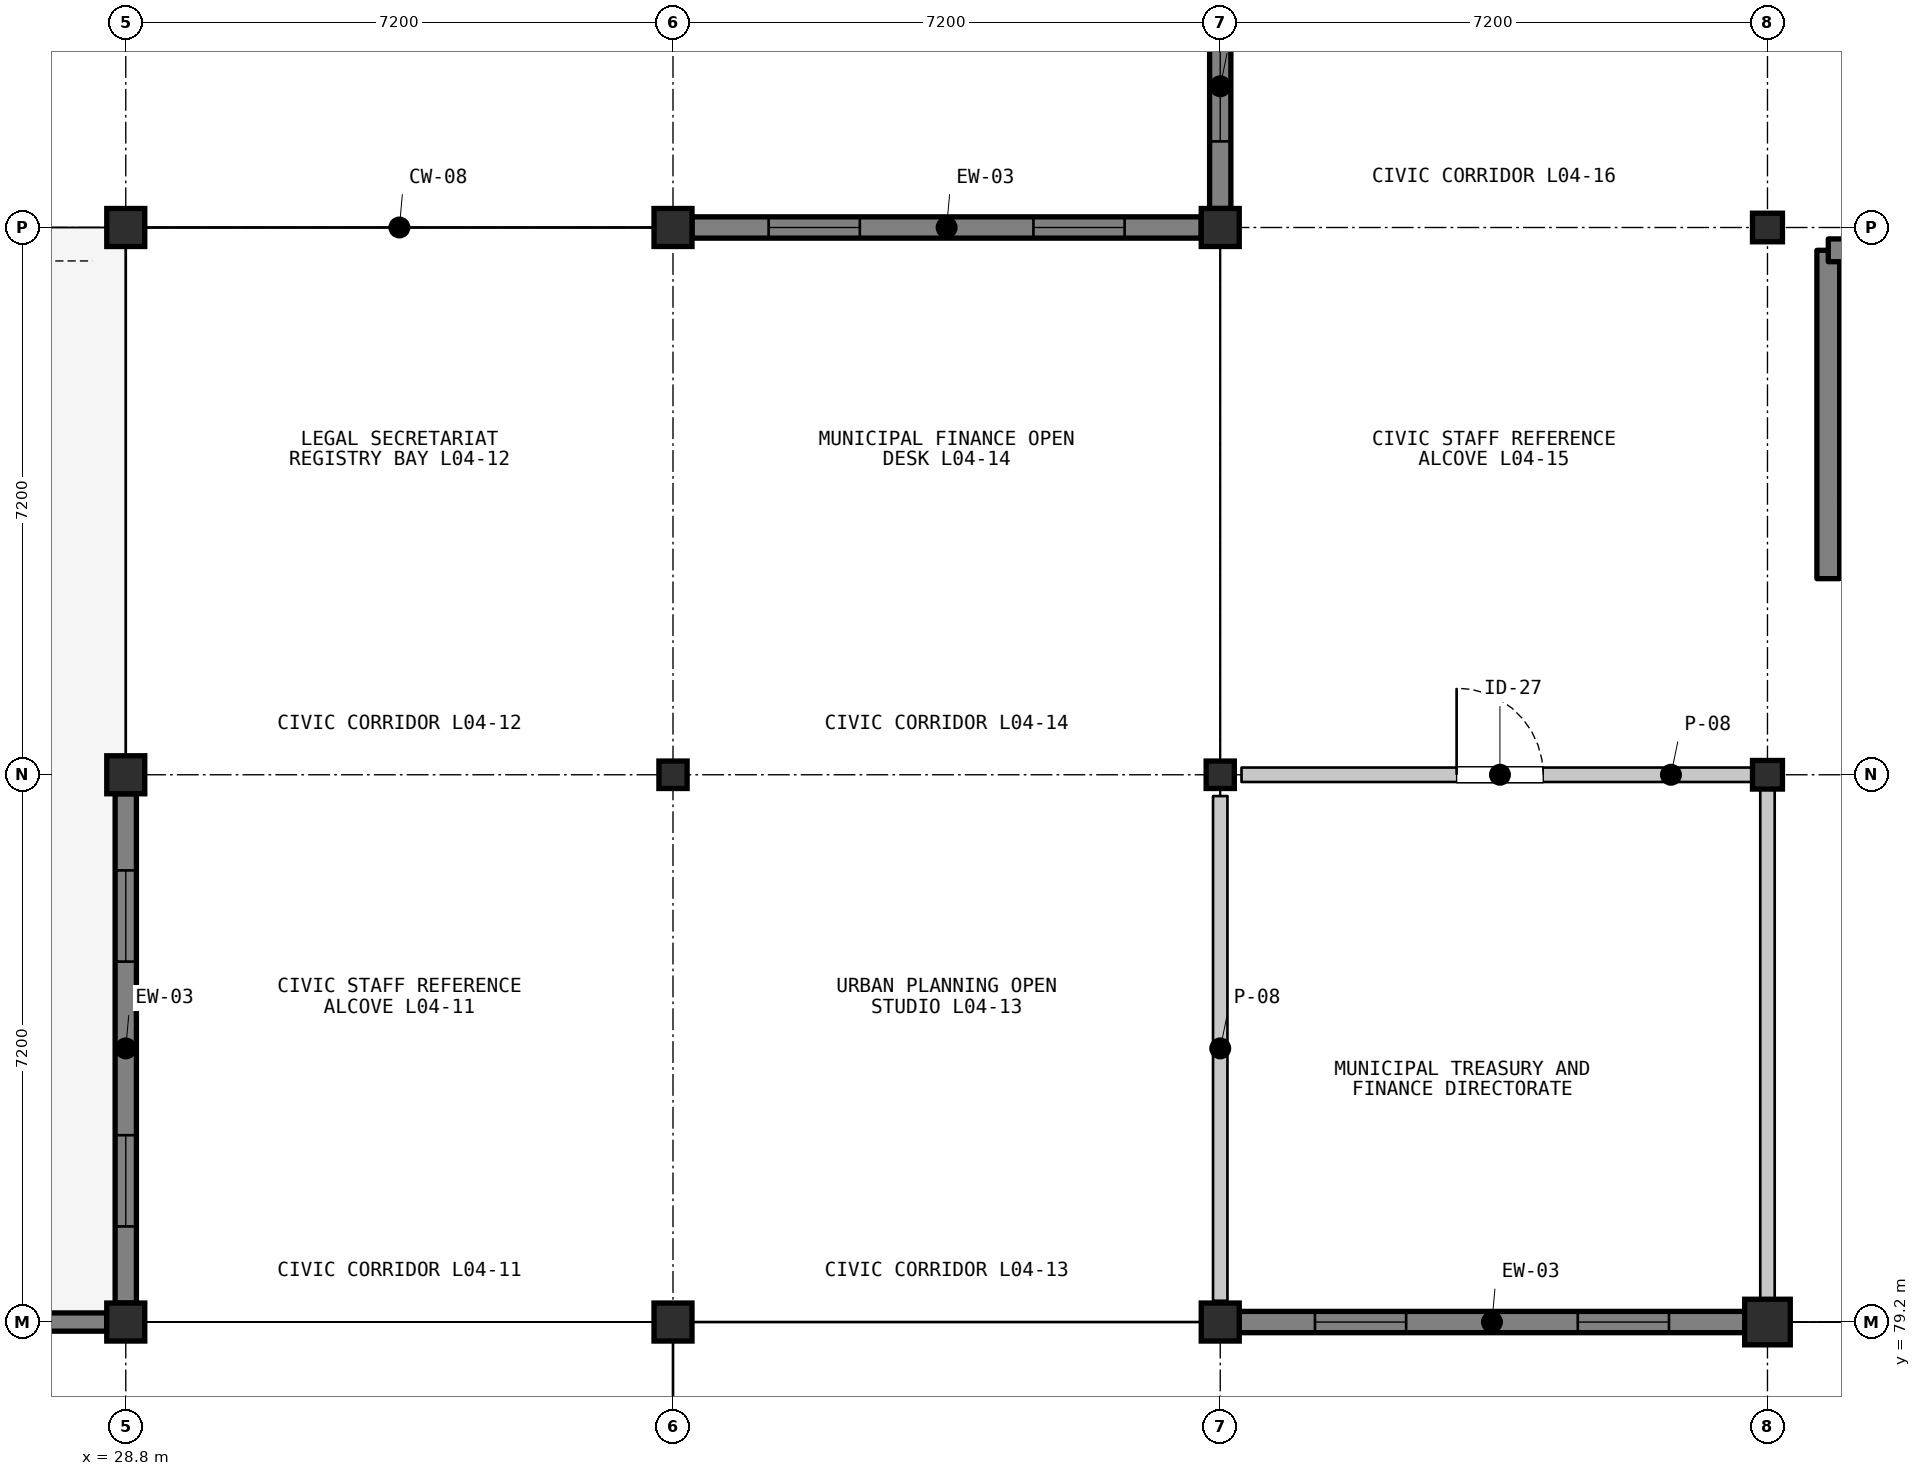
"""IFC4 building model, lengths in metres.
Left out: names, types, materials, properties, quantities, classifications, styles, units other than length and angle.
Written with IfcOpenShell. Run it as: python <this file> out.ifc"""

import sys

from ifc_helpers import new_model, si_unit, direction, frame, frame_2d, origin, origin_2d, place, context, subcontext, project, spatial, rectangle, i_section, extrude, element, fill, save


model = new_model("IFC4")
c1 = context("Model", 3, precision=1e-05, world=origin(), true_north=direction((0.0, 1.0)))
c2 = subcontext(c1, "Body", "Model", "MODEL_VIEW")
j1 = project(units=[si_unit("LENGTHUNIT", "METRE"), si_unit("PLANEANGLEUNIT", "RADIAN")], contexts=[c1])
p1 = place(None, origin())
s1 = spatial("IfcSite", under=j1, at=p1, CompositionType="ELEMENT")
p2 = place(p1, origin())
s2 = spatial("IfcBuilding", under=s1, at=p2, CompositionType="ELEMENT")
p3 = place(p2, frame((0.0, 0.0, 14.1)))
s3 = spatial("IfcBuildingStorey", under=s2, at=p3, CompositionType="ELEMENT", Elevation=14.1)
for number, where, z_axis, x_axis in (
    (1, (28.8, 79.2, 0.0), (0.0, 0.0, 1.0), (1.0, 0.0, 0.0)),
    (2, (28.8, 86.4, 0.0), (0.0, 0.0, 1.0), (1.0, 0.0, 0.0)),
    (3, (28.8, 93.6, 0.0), (0.0, 0.0, 1.0), (1.0, 0.0, 0.0)),
    (4, (36.0, 79.2, 0.0), (0.0, 0.0, 1.0), (1.0, 0.0, 0.0)),
):
    element("IfcColumn", number, at=place(p3, frame(where, z_axis=z_axis, x_axis=x_axis)), inside=s3, PredefinedType="COLUMN", context=c2, shape_type="SweptSolid", body=[
        extrude(rectangle(XDim=0.5, YDim=0.5, at=origin_2d()), origin(), (0.0, 0.0, 1.0), 3.9),
    ])
p4 = place(p3, frame((36.0, 86.4, 0.0), z_axis=(0.0, 0.0, 1.0), x_axis=(1.0, 0.0, 0.0)))
e5 = element("IfcColumn", 5, at=p4, inside=s3, PredefinedType="COLUMN", context=c2, shape_type="SweptSolid", body=[
    extrude(i_section(OverallWidth=0.371, OverallDepth=0.361, WebThickness=0.012, FlangeThickness=0.02, FilletRadius=0.015, at=origin_2d()), origin(), (0.0, 0.0, 1.0), 3.9),
])
for number, where, z_axis, x_axis in (
    (6, (36.0, 93.6, 0.0), (0.0, 0.0, 1.0), (1.0, 0.0, 0.0)),
    (7, (43.2, 79.2, 0.0), (0.0, 0.0, 1.0), (1.0, 0.0, 0.0)),
):
    element("IfcColumn", number, at=place(p3, frame(where, z_axis=z_axis, x_axis=x_axis)), inside=s3, PredefinedType="COLUMN", context=c2, shape_type="SweptSolid", body=[
        extrude(rectangle(XDim=0.5, YDim=0.5, at=origin_2d()), origin(), (0.0, 0.0, 1.0), 3.9),
    ])
p5 = place(p3, frame((43.2, 86.4, 0.0), z_axis=(0.0, 0.0, 1.0), x_axis=(1.0, 0.0, 0.0)))
e8 = element("IfcColumn", 8, at=p5, inside=s3, PredefinedType="COLUMN", context=c2, shape_type="SweptSolid", body=[
    extrude(i_section(OverallWidth=0.371, OverallDepth=0.361, WebThickness=0.012, FlangeThickness=0.02, FilletRadius=0.015, at=origin_2d()), origin(), (0.0, 0.0, 1.0), 3.9),
])
p6 = place(p3, frame((43.2, 93.6, 0.0), z_axis=(0.0, 0.0, 1.0), x_axis=(1.0, 0.0, 0.0)))
e9 = element("IfcColumn", 9, at=p6, inside=s3, PredefinedType="COLUMN", context=c2, shape_type="SweptSolid", body=[
    extrude(rectangle(XDim=0.5, YDim=0.5, at=origin_2d()), origin(), (0.0, 0.0, 1.0), 3.9),
])
p7 = place(p3, frame((50.4, 79.2, 0.0), z_axis=(0.0, 0.0, 1.0), x_axis=(1.0, 0.0, 0.0)))
e10 = element("IfcColumn", 10, at=p7, inside=s3, PredefinedType="COLUMN", context=c2, shape_type="SweptSolid", body=[
    extrude(rectangle(XDim=0.6, YDim=0.6, at=origin_2d()), origin(), (0.0, 0.0, 1.0), 3.9),
])
for number, where, z_axis, x_axis in (
    (11, (50.4, 86.4, 0.0), (0.0, 0.0, 1.0), (1.0, 0.0, 0.0)),
    (12, (50.4, 93.6, 0.0), (0.0, 0.0, 1.0), (1.0, 0.0, 0.0)),
):
    element("IfcColumn", number, at=place(p3, frame(where, z_axis=z_axis, x_axis=x_axis)), inside=s3, PredefinedType="COLUMN", context=c2, shape_type="SweptSolid", body=[
        extrude(i_section(OverallWidth=0.394, OverallDepth=0.376, WebThickness=0.017, FlangeThickness=0.028, FilletRadius=0.015, at=origin_2d()), origin(), (0.0, 0.0, 1.0), 3.9),
    ])
p8 = place(p3, frame((21.85, 79.2, 0.0), z_axis=(0.0, 0.0, 1.0), x_axis=(1.0, 0.0, 0.0)))
e13 = element("IfcWall", 13, at=p8, inside=s3, PredefinedType="SOLIDWALL", context=c2, shape_type="SweptSolid", body=[
    extrude(rectangle(XDim=6.7, YDim=0.24, at=frame_2d((3.35, 0.0))), origin(), (0.0, 0.0, 1.0), 3.118),
])
p9 = place(p8, frame((2.5, 0.0, 0.0)))
e14 = element("IfcOpeningElement", 14, at=p9, cuts=e13, PredefinedType="OPENING", context=c2, shape_type="SweptSolid", body=[
    extrude(rectangle(XDim=1.7, YDim=2.25, at=frame_2d((0.85, 1.125))), frame((0.0, 0.13, 0.0), z_axis=(0.0, -1.0, 0.0), x_axis=(1.0, 0.0, 0.0)), (0.0, 0.0, 1.0), 0.26),
])
p10 = place(p3, frame((28.8, 79.45, 0.0), z_axis=(0.0, 0.0, 1.0), x_axis=(0.0, 1.0, 0.0)))
e15 = element("IfcWall", 15, at=p10, inside=s3, PredefinedType="SOLIDWALL", context=c2, shape_type="SweptSolid", body=[
    extrude(rectangle(XDim=6.7, YDim=0.28, at=frame_2d((3.35, 0.0))), origin(), (0.0, 0.0, 1.0), 3.172),
])
p11 = place(p10, frame((1.008, 0.0, 0.95)))
e16 = element("IfcOpeningElement", 16, at=p11, cuts=e15, PredefinedType="OPENING", context=c2, shape_type="SweptSolid", body=[
    extrude(rectangle(XDim=1.2, YDim=1.7, at=frame_2d((0.6, 0.85))), frame((0.0, 0.15, 0.0), z_axis=(0.0, -1.0, 0.0), x_axis=(1.0, 0.0, 0.0)), (0.0, 0.0, 1.0), 0.3),
])
p12 = place(p10, frame((4.492, 0.0, 0.95)))
e17 = element("IfcOpeningElement", 17, at=p12, cuts=e15, PredefinedType="OPENING", context=c2, shape_type="SweptSolid", body=[
    extrude(rectangle(XDim=1.2, YDim=1.7, at=frame_2d((0.6, 0.85))), frame((0.0, 0.15, 0.0), z_axis=(0.0, -1.0, 0.0), x_axis=(1.0, 0.0, 0.0)), (0.0, 0.0, 1.0), 0.3),
])
p13 = place(p3, frame((36.25, 93.6, 0.0), z_axis=(0.0, 0.0, 1.0), x_axis=(1.0, 0.0, 0.0)))
e18 = element("IfcWall", 18, at=p13, inside=s3, PredefinedType="SOLIDWALL", context=c2, shape_type="SweptSolid", body=[
    extrude(rectangle(XDim=6.7, YDim=0.28, at=frame_2d((3.35, 0.0))), origin(), (0.0, 0.0, 1.0), 3.118),
])
p14 = place(p13, frame((1.008, 0.0, 0.95)))
e19 = element("IfcOpeningElement", 19, at=p14, cuts=e18, PredefinedType="OPENING", context=c2, shape_type="SweptSolid", body=[
    extrude(rectangle(XDim=1.2, YDim=1.7, at=frame_2d((0.6, 0.85))), frame((0.0, 0.15, 0.0), z_axis=(0.0, -1.0, 0.0), x_axis=(1.0, 0.0, 0.0)), (0.0, 0.0, 1.0), 0.3),
])
p15 = place(p13, frame((4.492, 0.0, 0.95)))
e20 = element("IfcOpeningElement", 20, at=p15, cuts=e18, PredefinedType="OPENING", context=c2, shape_type="SweptSolid", body=[
    extrude(rectangle(XDim=1.2, YDim=1.7, at=frame_2d((0.6, 0.85))), frame((0.0, 0.15, 0.0), z_axis=(0.0, -1.0, 0.0), x_axis=(1.0, 0.0, 0.0)), (0.0, 0.0, 1.0), 0.3),
])
p16 = place(p3, frame((50.1, 79.2, 0.0), z_axis=(0.0, 0.0, 1.0), x_axis=(-1.0, 0.0, 0.0)))
e21 = element("IfcWall", 21, at=p16, inside=s3, PredefinedType="SOLIDWALL", context=c2, shape_type="SweptSolid", body=[
    extrude(rectangle(XDim=6.65, YDim=0.28, at=frame_2d((3.325, 0.0))), origin(), (0.0, 0.0, 1.0), 3.118),
])
p17 = place(p16, frame((0.996, 0.0, 0.95)))
e22 = element("IfcOpeningElement", 22, at=p17, cuts=e21, PredefinedType="OPENING", context=c2, shape_type="SweptSolid", body=[
    extrude(rectangle(XDim=1.2, YDim=1.7, at=frame_2d((0.6, 0.85))), frame((0.0, 0.15, 0.0), z_axis=(0.0, -1.0, 0.0), x_axis=(1.0, 0.0, 0.0)), (0.0, 0.0, 1.0), 0.3),
])
p18 = place(p16, frame((4.454, 0.0, 0.95)))
e23 = element("IfcOpeningElement", 23, at=p18, cuts=e21, PredefinedType="OPENING", context=c2, shape_type="SweptSolid", body=[
    extrude(rectangle(XDim=1.2, YDim=1.7, at=frame_2d((0.6, 0.85))), frame((0.0, 0.15, 0.0), z_axis=(0.0, -1.0, 0.0), x_axis=(1.0, 0.0, 0.0)), (0.0, 0.0, 1.0), 0.3),
])
p19 = place(p3, frame((43.2, 93.85, 0.0), z_axis=(0.0, 0.0, 1.0), x_axis=(0.0, 1.0, 0.0)))
e24 = element("IfcWall", 24, at=p19, inside=s3, PredefinedType="SOLIDWALL", context=c2, shape_type="SweptSolid", body=[
    extrude(rectangle(XDim=6.7, YDim=0.28, at=frame_2d((3.35, 0.0))), origin(), (0.0, 0.0, 1.0), 3.192),
])
p20 = place(p19, frame((0.883, 0.0, 0.95)))
e25 = element("IfcOpeningElement", 25, at=p20, cuts=e24, PredefinedType="OPENING", context=c2, shape_type="SweptSolid", body=[
    extrude(rectangle(XDim=1.45, YDim=1.85, at=frame_2d((0.725, 0.925))), frame((0.0, 0.15, 0.0), z_axis=(0.0, -1.0, 0.0), x_axis=(1.0, 0.0, 0.0)), (0.0, 0.0, 1.0), 0.3),
])
p21 = place(p19, frame((4.367, 0.0, 0.95)))
e26 = element("IfcOpeningElement", 26, at=p21, cuts=e24, PredefinedType="OPENING", context=c2, shape_type="SweptSolid", body=[
    extrude(rectangle(XDim=1.45, YDim=1.85, at=frame_2d((0.725, 0.925))), frame((0.0, 0.15, 0.0), z_axis=(0.0, -1.0, 0.0), x_axis=(1.0, 0.0, 0.0)), (0.0, 0.0, 1.0), 0.3),
])
p22 = place(p3, frame((51.2, 88.98, 0.0), z_axis=(0.0, 0.0, 1.0), x_axis=(0.0, 1.0, 0.0)))
e27 = element("IfcWall", 27, at=p22, inside=s3, PredefinedType="SHEAR", context=c2, shape_type="SweptSolid", body=[
    extrude(rectangle(XDim=4.32, YDim=0.3, at=frame_2d((2.16, 0.0))), origin(), (0.0, 0.0, 1.0), 3.72),
])
p23 = place(p3, frame((51.2, 93.3, 0.0), z_axis=(0.0, 0.0, 1.0), x_axis=(1.0, 0.0, 0.0)))
e28 = element("IfcWall", 28, at=p23, inside=s3, PredefinedType="SHEAR", context=c2, shape_type="SweptSolid", body=[
    extrude(rectangle(XDim=5.92, YDim=0.3, at=frame_2d((2.96, 0.0))), origin(), (0.0, 0.0, 1.0), 3.72),
])
p24 = place(p3, frame((51.35, 90.15, 0.0), z_axis=(0.0, 0.0, 1.0), x_axis=(1.0, 0.0, 0.0)))
e29 = element("IfcWall", 29, at=p24, inside=s3, PredefinedType="SHEAR", context=c2, shape_type="SweptSolid", body=[
    extrude(rectangle(XDim=2.4, YDim=0.22, at=frame_2d((1.2, 0.0))), origin(), (0.0, 0.0, 1.0), 3.72),
])
p25 = place(p3, frame((43.48, 86.4, 0.0), z_axis=(0.0, 0.0, 1.0), x_axis=(1.0, 0.0, 0.0)))
e30 = element("IfcWall", 30, at=p25, inside=s3, PredefinedType="PARTITIONING", context=c2, shape_type="SweptSolid", body=[
    extrude(rectangle(XDim=6.8, YDim=0.19, at=frame_2d((3.4, 0.0))), origin(), (0.0, 0.0, 1.0), 3.108),
])
p26 = place(p25, frame((2.83, 0.0, 0.0)))
e31 = element("IfcOpeningElement", 31, at=p26, cuts=e30, PredefinedType="OPENING", context=c2, shape_type="SweptSolid", body=[
    extrude(rectangle(XDim=1.14, YDim=2.18, at=frame_2d((0.57, 1.09))), frame((0.0, 0.105, 0.0), z_axis=(0.0, -1.0, 0.0), x_axis=(1.0, 0.0, 0.0)), (0.0, 0.0, 1.0), 0.21),
])
p27 = place(p3, frame((43.2, 79.48, 0.0), z_axis=(0.0, 0.0, 1.0), x_axis=(0.0, 1.0, 0.0)))
e32 = element("IfcWall", 32, at=p27, inside=s3, PredefinedType="PARTITIONING", context=c2, shape_type="SweptSolid", body=[
    extrude(rectangle(XDim=6.64, YDim=0.19, at=frame_2d((3.32, 0.0))), origin(), (0.0, 0.0, 1.0), 3.177),
])
p28 = place(p3, frame((50.4, 86.28, 0.0), z_axis=(0.0, 0.0, 1.0), x_axis=(0.0, -1.0, 0.0)))
e33 = element("IfcWall", 33, at=p28, inside=s3, PredefinedType="PARTITIONING", context=c2, shape_type="SweptSolid", body=[
    extrude(rectangle(XDim=6.96, YDim=0.19, at=frame_2d((3.48, 0.0))), origin(), (0.0, 0.0, 1.0), 3.108),
])
p29 = place(p11, origin())
e34 = element("IfcWindow", 34, at=p29, inside=s3, PartitioningType="SINGLE_PANEL", PredefinedType="WINDOW", context=c2, shape_type="SweptSolid", body=[
    extrude(rectangle(XDim=1.2, YDim=1.7, at=frame_2d((0.6, 0.85))), frame((0.0, 0.03, 0.0), z_axis=(0.0, -1.0, 0.0), x_axis=(1.0, 0.0, 0.0)), (0.0, 0.0, 1.0), 0.06),
])
fill(e16, e34)
p30 = place(p12, origin())
e35 = element("IfcWindow", 35, at=p30, inside=s3, PartitioningType="SINGLE_PANEL", PredefinedType="WINDOW", context=c2, shape_type="SweptSolid", body=[
    extrude(rectangle(XDim=1.2, YDim=1.7, at=frame_2d((0.6, 0.85))), frame((0.0, 0.03, 0.0), z_axis=(0.0, -1.0, 0.0), x_axis=(1.0, 0.0, 0.0)), (0.0, 0.0, 1.0), 0.06),
])
fill(e17, e35)
p31 = place(p14, origin())
e36 = element("IfcWindow", 36, at=p31, inside=s3, PartitioningType="SINGLE_PANEL", PredefinedType="WINDOW", context=c2, shape_type="SweptSolid", body=[
    extrude(rectangle(XDim=1.2, YDim=1.7, at=frame_2d((0.6, 0.85))), frame((0.0, 0.03, 0.0), z_axis=(0.0, -1.0, 0.0), x_axis=(1.0, 0.0, 0.0)), (0.0, 0.0, 1.0), 0.06),
])
fill(e19, e36)
p32 = place(p15, origin())
e37 = element("IfcWindow", 37, at=p32, inside=s3, PartitioningType="SINGLE_PANEL", PredefinedType="WINDOW", context=c2, shape_type="SweptSolid", body=[
    extrude(rectangle(XDim=1.2, YDim=1.7, at=frame_2d((0.6, 0.85))), frame((0.0, 0.03, 0.0), z_axis=(0.0, -1.0, 0.0), x_axis=(1.0, 0.0, 0.0)), (0.0, 0.0, 1.0), 0.06),
])
fill(e20, e37)
p33 = place(p17, origin())
e38 = element("IfcWindow", 38, at=p33, inside=s3, PartitioningType="SINGLE_PANEL", PredefinedType="WINDOW", context=c2, shape_type="SweptSolid", body=[
    extrude(rectangle(XDim=1.2, YDim=1.7, at=frame_2d((0.6, 0.85))), frame((0.0, 0.03, 0.0), z_axis=(0.0, -1.0, 0.0), x_axis=(1.0, 0.0, 0.0)), (0.0, 0.0, 1.0), 0.06),
])
fill(e22, e38)
p34 = place(p18, origin())
e39 = element("IfcWindow", 39, at=p34, inside=s3, PartitioningType="SINGLE_PANEL", PredefinedType="WINDOW", context=c2, shape_type="SweptSolid", body=[
    extrude(rectangle(XDim=1.2, YDim=1.7, at=frame_2d((0.6, 0.85))), frame((0.0, 0.03, 0.0), z_axis=(0.0, -1.0, 0.0), x_axis=(1.0, 0.0, 0.0)), (0.0, 0.0, 1.0), 0.06),
])
fill(e23, e39)
p35 = place(p20, origin())
e40 = element("IfcWindow", 40, at=p35, inside=s3, PartitioningType="SINGLE_PANEL", PredefinedType="WINDOW", context=c2, shape_type="SweptSolid", body=[
    extrude(rectangle(XDim=1.45, YDim=1.85, at=frame_2d((0.725, 0.925))), frame((0.0, 0.03, 0.0), z_axis=(0.0, -1.0, 0.0), x_axis=(1.0, 0.0, 0.0)), (0.0, 0.0, 1.0), 0.06),
])
fill(e25, e40)
p36 = place(p26, origin())
e41 = element("IfcDoor", 41, at=p36, inside=s3, OperationType="SINGLE_SWING_LEFT", PredefinedType="DOOR", context=c2, shape_type="SweptSolid", body=[
    extrude(rectangle(XDim=1.14, YDim=2.18, at=frame_2d((0.57, 1.09))), frame((0.0, 0.025, 0.0), z_axis=(0.0, -1.0, 0.0), x_axis=(1.0, 0.0, 0.0)), (0.0, 0.0, 1.0), 0.05),
])
fill(e31, e41)
save(model, sys.argv[1])
